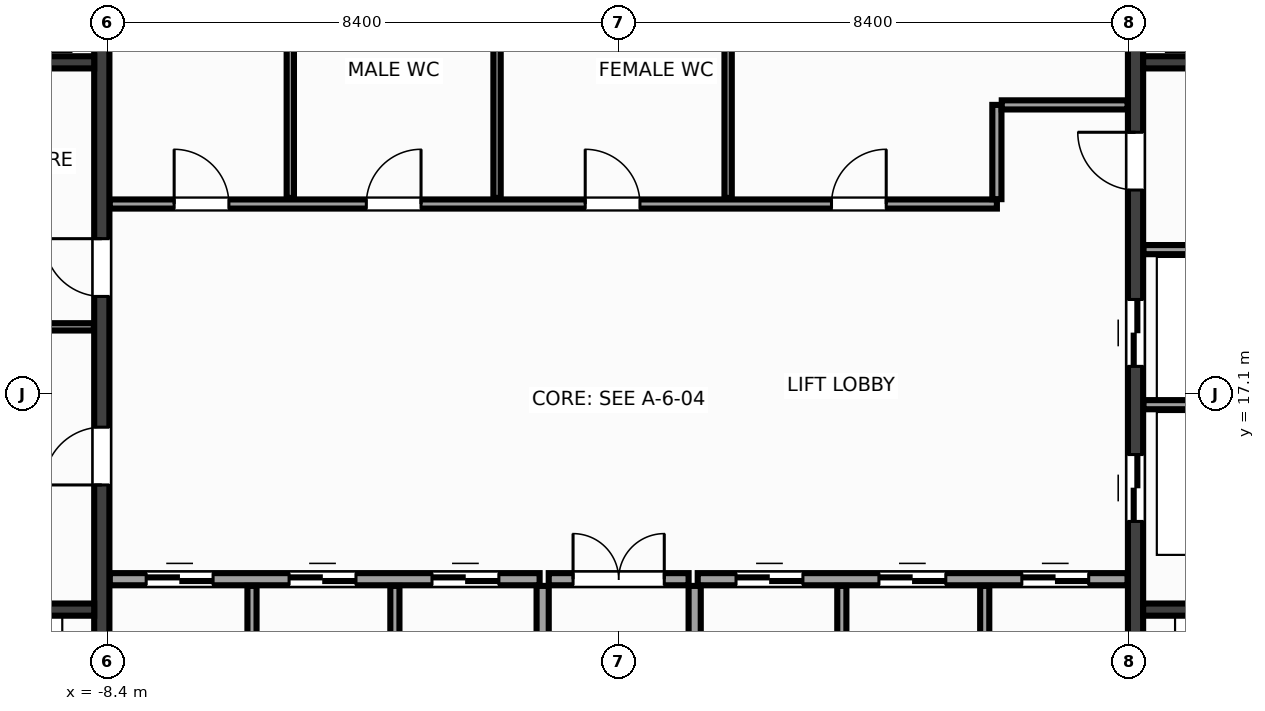
"""IFC4 building model, lengths in metres.
Left out: names, types, materials, properties, quantities, classifications, styles, units other than length and angle.
Written with IfcOpenShell. Run it as: python <this file> out.ifc"""

import sys

from ifc_helpers import new_model, si_unit, direction, frame, frame_2d, origin, place, context, subcontext, project, spatial, rectangle, extrude, source, transform, mapped, element, fill, save


model = new_model("IFC4")
c1 = context("Model", 3, precision=1e-05, world=origin(), true_north=direction((0.0, 1.0)))
c2 = subcontext(c1, "Body", "Model", "MODEL_VIEW")
j1 = project(units=[si_unit("LENGTHUNIT", "METRE"), si_unit("PLANEANGLEUNIT", "RADIAN")], contexts=[c1])
p1 = place(None, origin())
s1 = spatial("IfcSite", under=j1, at=p1, CompositionType="ELEMENT")
p2 = place(p1, origin())
s2 = spatial("IfcBuilding", under=s1, at=p2, CompositionType="ELEMENT")
p3 = place(p2, frame((0.0, 0.0, 77.6)))
s3 = spatial("IfcBuildingStorey", under=s2, at=p3, CompositionType="ELEMENT", Elevation=77.6)
m1 = source(origin(), c2, "Body", "SweptSolid", [
    extrude(rectangle(XDim=12.95, YDim=0.25, at=frame_2d((6.475, 0.0))), origin(), (0.0, 0.0, 1.0), 3.6),
])
p4 = place(p3, frame((-8.5, 10.525, 0.0), z_axis=(0.0, 0.0, 1.0), x_axis=(0.0, 1.0, 0.0)))
e1 = element("IfcWall", 1, at=p4, inside=s3, PredefinedType="SHEAR", context=c2, shape_type="MappedRepresentation", body=[
    mapped(m1, transform((0.0, 0.0, 0.0), x_axis=(1.0, 0.0, 0.0), y_axis=(0.0, 1.0, 0.0), z_axis=(0.0, 0.0, 1.0), scale=1.0)),
])
p5 = place(p4, frame((5.075, 0.0, 0.0)))
e2 = element("IfcOpeningElement", 2, at=p5, cuts=e1, PredefinedType="OPENING", context=c2, shape_type="SweptSolid", body=[
    extrude(rectangle(XDim=0.95, YDim=2.15, at=frame_2d((0.475, 1.075))), frame((0.0, 0.137, 0.0), z_axis=(0.0, -1.0, 0.0), x_axis=(1.0, 0.0, 0.0)), (0.0, 0.0, 1.0), 0.274),
])
p6 = place(p4, frame((8.175, 0.0, 0.0)))
e3 = element("IfcOpeningElement", 3, at=p6, cuts=e1, PredefinedType="OPENING", context=c2, shape_type="SweptSolid", body=[
    extrude(rectangle(XDim=0.95, YDim=2.15, at=frame_2d((0.475, 1.075))), frame((0.0, 0.137, 0.0), z_axis=(0.0, -1.0, 0.0), x_axis=(1.0, 0.0, 0.0)), (0.0, 0.0, 1.0), 0.274),
])
p7 = place(p3, frame((8.5, 10.525, 0.0), z_axis=(0.0, 0.0, 1.0), x_axis=(0.0, 1.0, 0.0)))
e4 = element("IfcWall", 4, at=p7, inside=s3, PredefinedType="SHEAR", context=c2, shape_type="MappedRepresentation", body=[
    mapped(m1, transform((0.0, 0.0, 0.0), x_axis=(1.0, 0.0, 0.0), y_axis=(0.0, 1.0, 0.0), z_axis=(0.0, 0.0, 1.0), scale=1.0)),
])
p8 = place(p7, frame((4.475, 0.0, 0.0)))
e5 = element("IfcOpeningElement", 5, at=p8, cuts=e4, PredefinedType="OPENING", context=c2, shape_type="SweptSolid", body=[
    extrude(rectangle(XDim=1.1, YDim=2.15, at=frame_2d((0.55, 1.075))), frame((0.0, 0.137, 0.0), z_axis=(0.0, -1.0, 0.0), x_axis=(1.0, 0.0, 0.0)), (0.0, 0.0, 1.0), 0.274),
])
p9 = place(p7, frame((7.025, 0.0, 0.0)))
e6 = element("IfcOpeningElement", 6, at=p9, cuts=e4, PredefinedType="OPENING", context=c2, shape_type="SweptSolid", body=[
    extrude(rectangle(XDim=1.1, YDim=2.15, at=frame_2d((0.55, 1.075))), frame((0.0, 0.137, 0.0), z_axis=(0.0, -1.0, 0.0), x_axis=(1.0, 0.0, 0.0)), (0.0, 0.0, 1.0), 0.274),
])
p10 = place(p7, frame((9.925, 0.0, 0.0)))
e7 = element("IfcOpeningElement", 7, at=p10, cuts=e4, PredefinedType="OPENING", context=c2, shape_type="SweptSolid", body=[
    extrude(rectangle(XDim=0.95, YDim=2.15, at=frame_2d((0.475, 1.075))), frame((0.0, 0.137, 0.0), z_axis=(0.0, -1.0, 0.0), x_axis=(1.0, 0.0, 0.0)), (0.0, 0.0, 1.0), 0.274),
])
m2 = source(origin(), c2, "Body", "SweptSolid", [
    extrude(rectangle(XDim=2.825, YDim=0.2, at=frame_2d((1.413, 0.0))), origin(), (0.0, 0.0, 1.0), 3.6),
])
for number, where, z_axis, x_axis in (
    (8, (-11.45, 13.55, 0.0), (0.0, 0.0, 1.0), (1.0, 0.0, 0.0)),
    (9, (8.625, 13.55, 0.0), (0.0, 0.0, 1.0), (1.0, 0.0, 0.0)),
):
    element("IfcWall", number, at=place(p3, frame(where, z_axis=z_axis, x_axis=x_axis)), inside=s3, PredefinedType="SHEAR", context=c2, shape_type="MappedRepresentation", body=[
        mapped(m2, transform((0.0, 0.0, 0.0), x_axis=(1.0, 0.0, 0.0), y_axis=(0.0, 1.0, 0.0), z_axis=(0.0, 0.0, 1.0), scale=1.0)),
    ])
m3 = source(origin(), c2, "Body", "SweptSolid", [
    extrude(rectangle(XDim=3.02, YDim=0.2, at=frame_2d((1.51, 0.0))), origin(), (0.0, 0.0, 1.0), 3.6),
])
for number, where, z_axis, x_axis in (
    (10, (-11.645, 22.55, 0.0), (0.0, 0.0, 1.0), (1.0, 0.0, 0.0)),
    (11, (8.625, 22.55, 0.0), (0.0, 0.0, 1.0), (1.0, 0.0, 0.0)),
):
    element("IfcWall", number, at=place(p3, frame(where, z_axis=z_axis, x_axis=x_axis)), inside=s3, PredefinedType="SHEAR", context=c2, shape_type="MappedRepresentation", body=[
        mapped(m3, transform((0.0, 0.0, 0.0), x_axis=(1.0, 0.0, 0.0), y_axis=(0.0, 1.0, 0.0), z_axis=(0.0, 0.0, 1.0), scale=1.0)),
    ])
m4 = source(origin(), c2, "Body", "SweptSolid", [
    extrude(rectangle(XDim=3.01, YDim=0.12, at=frame_2d((1.505, 0.0))), origin(), (0.0, 0.0, 1.0), 3.36),
])
p11 = place(p3, frame((-11.64, 18.2, 0.0), z_axis=(0.0, 0.0, 1.0), x_axis=(1.0, 0.0, 0.0)))
e12 = element("IfcWall", 12, at=p11, inside=s3, PredefinedType="PARTITIONING", context=c2, shape_type="MappedRepresentation", body=[
    mapped(m4, transform((0.0, 0.0, 0.0), x_axis=(1.0, 0.0, 0.0), y_axis=(0.0, 1.0, 0.0), z_axis=(0.0, 0.0, 1.0), scale=1.0)),
])
m5 = source(origin(), c2, "Body", "SweptSolid", [
    extrude(rectangle(XDim=3.01, YDim=0.15, at=frame_2d((1.505, 0.0))), origin(), (0.0, 0.0, 1.0), 3.36),
])
for number, where, z_axis, x_axis in (
    (13, (8.63, 16.92, 0.0), (0.0, 0.0, 1.0), (1.0, 0.0, 0.0)),
    (14, (8.63, 19.47, 0.0), (0.0, 0.0, 1.0), (1.0, 0.0, 0.0)),
):
    element("IfcWall", number, at=place(p3, frame(where, z_axis=z_axis, x_axis=x_axis)), inside=s3, PredefinedType="PARTITIONING", context=c2, shape_type="MappedRepresentation", body=[
        mapped(m5, transform((0.0, 0.0, 0.0), x_axis=(1.0, 0.0, 0.0), y_axis=(0.0, 1.0, 0.0), z_axis=(0.0, 0.0, 1.0), scale=1.0)),
    ])
m6 = source(origin(), c2, "Body", "SweptSolid", [
    extrude(rectangle(XDim=7.07, YDim=0.2, at=frame_2d((3.535, 0.0))), origin(), (0.0, 0.0, 1.0), 3.36),
])
p12 = place(p3, frame((-8.37, 14.05, 0.0), z_axis=(0.0, 0.0, 1.0), x_axis=(1.0, 0.0, 0.0)))
e15 = element("IfcWall", 15, at=p12, inside=s3, PredefinedType="PARTITIONING", context=c2, shape_type="MappedRepresentation", body=[
    mapped(m6, transform((0.0, 0.0, 0.0), x_axis=(1.0, 0.0, 0.0), y_axis=(0.0, 1.0, 0.0), z_axis=(0.0, 0.0, 1.0), scale=1.0)),
])
p13 = place(p12, frame((0.6, 0.0, 0.0)))
e16 = element("IfcOpeningElement", 16, at=p13, cuts=e15, PredefinedType="OPENING", context=c2, shape_type="SweptSolid", body=[
    extrude(rectangle(XDim=1.1, YDim=2.15, at=frame_2d((0.55, 1.075))), frame((0.0, 0.112, 0.0), z_axis=(0.0, -1.0, 0.0), x_axis=(1.0, 0.0, 0.0)), (0.0, 0.0, 1.0), 0.224),
])
p14 = place(p12, frame((2.95, 0.0, 0.0)))
e17 = element("IfcOpeningElement", 17, at=p14, cuts=e15, PredefinedType="OPENING", context=c2, shape_type="SweptSolid", body=[
    extrude(rectangle(XDim=1.1, YDim=2.15, at=frame_2d((0.55, 1.075))), frame((0.0, 0.112, 0.0), z_axis=(0.0, -1.0, 0.0), x_axis=(1.0, 0.0, 0.0)), (0.0, 0.0, 1.0), 0.224),
])
p15 = place(p12, frame((5.3, 0.0, 0.0)))
e18 = element("IfcOpeningElement", 18, at=p15, cuts=e15, PredefinedType="OPENING", context=c2, shape_type="SweptSolid", body=[
    extrude(rectangle(XDim=1.1, YDim=2.15, at=frame_2d((0.55, 1.075))), frame((0.0, 0.112, 0.0), z_axis=(0.0, -1.0, 0.0), x_axis=(1.0, 0.0, 0.0)), (0.0, 0.0, 1.0), 0.224),
])
p16 = place(p3, frame((1.3, 14.05, 0.0), z_axis=(0.0, 0.0, 1.0), x_axis=(1.0, 0.0, 0.0)))
e19 = element("IfcWall", 19, at=p16, inside=s3, PredefinedType="PARTITIONING", context=c2, shape_type="MappedRepresentation", body=[
    mapped(m6, transform((0.0, 0.0, 0.0), x_axis=(1.0, 0.0, 0.0), y_axis=(0.0, 1.0, 0.0), z_axis=(0.0, 0.0, 1.0), scale=1.0)),
])
p17 = place(p16, frame((0.63, 0.0, 0.0)))
e20 = element("IfcOpeningElement", 20, at=p17, cuts=e19, PredefinedType="OPENING", context=c2, shape_type="SweptSolid", body=[
    extrude(rectangle(XDim=1.1, YDim=2.15, at=frame_2d((0.55, 1.075))), frame((0.0, 0.112, 0.0), z_axis=(0.0, -1.0, 0.0), x_axis=(1.0, 0.0, 0.0)), (0.0, 0.0, 1.0), 0.224),
])
p18 = place(p16, frame((2.98, 0.0, 0.0)))
e21 = element("IfcOpeningElement", 21, at=p18, cuts=e19, PredefinedType="OPENING", context=c2, shape_type="SweptSolid", body=[
    extrude(rectangle(XDim=1.1, YDim=2.15, at=frame_2d((0.55, 1.075))), frame((0.0, 0.112, 0.0), z_axis=(0.0, -1.0, 0.0), x_axis=(1.0, 0.0, 0.0)), (0.0, 0.0, 1.0), 0.224),
])
p19 = place(p16, frame((5.33, 0.0, 0.0)))
e22 = element("IfcOpeningElement", 22, at=p19, cuts=e19, PredefinedType="OPENING", context=c2, shape_type="SweptSolid", body=[
    extrude(rectangle(XDim=1.1, YDim=2.15, at=frame_2d((0.55, 1.075))), frame((0.0, 0.112, 0.0), z_axis=(0.0, -1.0, 0.0), x_axis=(1.0, 0.0, 0.0)), (0.0, 0.0, 1.0), 0.224),
])
m7 = source(origin(), c2, "Body", "SweptSolid", [
    extrude(rectangle(XDim=3.415, YDim=0.2, at=frame_2d((1.708, 0.0))), origin(), (0.0, 0.0, 1.0), 3.36),
])
for number, where, z_axis, x_axis in (
    (23, (-1.25, 10.525, 0.0), (0.0, 0.0, 1.0), (0.0, 1.0, 0.0)),
    (24, (1.25, 10.525, 0.0), (0.0, 0.0, 1.0), (0.0, 1.0, 0.0)),
):
    element("IfcWall", number, at=place(p3, frame(where, z_axis=z_axis, x_axis=x_axis)), inside=s3, PredefinedType="PARTITIONING", context=c2, shape_type="MappedRepresentation", body=[
        mapped(m7, transform((0.0, 0.0, 0.0), x_axis=(1.0, 0.0, 0.0), y_axis=(0.0, 1.0, 0.0), z_axis=(0.0, 0.0, 1.0), scale=1.0)),
    ])
m8 = source(origin(), c2, "Body", "SweptSolid", [
    extrude(rectangle(XDim=2.3, YDim=0.2, at=frame_2d((1.15, 0.0))), origin(), (0.0, 0.0, 1.0), 3.36),
])
p20 = place(p3, frame((-1.15, 14.05, 0.0), z_axis=(0.0, 0.0, 1.0), x_axis=(1.0, 0.0, 0.0)))
e25 = element("IfcWall", 25, at=p20, inside=s3, PredefinedType="PARTITIONING", context=c2, shape_type="MappedRepresentation", body=[
    mapped(m8, transform((0.0, 0.0, 0.0), x_axis=(1.0, 0.0, 0.0), y_axis=(0.0, 1.0, 0.0), z_axis=(0.0, 0.0, 1.0), scale=1.0)),
])
p21 = place(p20, frame((0.4, 0.0, 0.0)))
e26 = element("IfcOpeningElement", 26, at=p21, cuts=e25, PredefinedType="OPENING", context=c2, shape_type="SweptSolid", body=[
    extrude(rectangle(XDim=1.5, YDim=2.2, at=frame_2d((0.75, 1.1))), frame((0.0, 0.112, 0.0), z_axis=(0.0, -1.0, 0.0), x_axis=(1.0, 0.0, 0.0)), (0.0, 0.0, 1.0), 0.224),
])
m9 = source(origin(), c2, "Body", "SweptSolid", [
    extrude(rectangle(XDim=14.59, YDim=0.15, at=frame_2d((7.295, 0.0))), origin(), (0.0, 0.0, 1.0), 3.36),
])
p22 = place(p3, frame((-8.37, 20.22, 0.0), z_axis=(0.0, 0.0, 1.0), x_axis=(1.0, 0.0, 0.0)))
e27 = element("IfcWall", 27, at=p22, inside=s3, PredefinedType="PARTITIONING", context=c2, shape_type="MappedRepresentation", body=[
    mapped(m9, transform((0.0, 0.0, 0.0), x_axis=(1.0, 0.0, 0.0), y_axis=(0.0, 1.0, 0.0), z_axis=(0.0, 0.0, 1.0), scale=1.0)),
])
p23 = place(p22, frame((1.06, 0.0, 0.0)))
e28 = element("IfcOpeningElement", 28, at=p23, cuts=e27, PredefinedType="OPENING", context=c2, shape_type="SweptSolid", body=[
    extrude(rectangle(XDim=0.9, YDim=2.15, at=frame_2d((0.45, 1.075))), frame((0.0, 0.087, 0.0), z_axis=(0.0, -1.0, 0.0), x_axis=(1.0, 0.0, 0.0)), (0.0, 0.0, 1.0), 0.174),
])
p24 = place(p22, frame((4.22, 0.0, 0.0)))
e29 = element("IfcOpeningElement", 29, at=p24, cuts=e27, PredefinedType="OPENING", context=c2, shape_type="SweptSolid", body=[
    extrude(rectangle(XDim=0.9, YDim=2.15, at=frame_2d((0.45, 1.075))), frame((0.0, 0.087, 0.0), z_axis=(0.0, -1.0, 0.0), x_axis=(1.0, 0.0, 0.0)), (0.0, 0.0, 1.0), 0.174),
])
p25 = place(p22, frame((7.82, 0.0, 0.0)))
e30 = element("IfcOpeningElement", 30, at=p25, cuts=e27, PredefinedType="OPENING", context=c2, shape_type="SweptSolid", body=[
    extrude(rectangle(XDim=0.9, YDim=2.15, at=frame_2d((0.45, 1.075))), frame((0.0, 0.087, 0.0), z_axis=(0.0, -1.0, 0.0), x_axis=(1.0, 0.0, 0.0)), (0.0, 0.0, 1.0), 0.174),
])
p26 = place(p22, frame((11.87, 0.0, 0.0)))
e31 = element("IfcOpeningElement", 31, at=p26, cuts=e27, PredefinedType="OPENING", context=c2, shape_type="SweptSolid", body=[
    extrude(rectangle(XDim=0.9, YDim=2.15, at=frame_2d((0.45, 1.075))), frame((0.0, 0.087, 0.0), z_axis=(0.0, -1.0, 0.0), x_axis=(1.0, 0.0, 0.0)), (0.0, 0.0, 1.0), 0.174),
])
m10 = source(origin(), c2, "Body", "SweptSolid", [
    extrude(rectangle(XDim=1.55, YDim=0.15, at=frame_2d((0.775, 0.0))), origin(), (0.0, 0.0, 1.0), 3.36),
])
p27 = place(p3, frame((6.22, 20.3, 0.0), z_axis=(0.0, 0.0, 1.0), x_axis=(0.0, 1.0, 0.0)))
e32 = element("IfcWall", 32, at=p27, inside=s3, PredefinedType="PARTITIONING", context=c2, shape_type="MappedRepresentation", body=[
    mapped(m10, transform((0.0, 0.0, 0.0), x_axis=(1.0, 0.0, 0.0), y_axis=(0.0, 1.0, 0.0), z_axis=(0.0, 0.0, 1.0), scale=1.0)),
])
m11 = source(origin(), c2, "Body", "SweptSolid", [
    extrude(rectangle(XDim=2.07, YDim=0.15, at=frame_2d((1.035, 0.0))), origin(), (0.0, 0.0, 1.0), 3.36),
])
p28 = place(p3, frame((6.3, 21.85, 0.0), z_axis=(0.0, 0.0, 1.0), x_axis=(1.0, 0.0, 0.0)))
e33 = element("IfcWall", 33, at=p28, inside=s3, PredefinedType="PARTITIONING", context=c2, shape_type="MappedRepresentation", body=[
    mapped(m11, transform((0.0, 0.0, 0.0), x_axis=(1.0, 0.0, 0.0), y_axis=(0.0, 1.0, 0.0), z_axis=(0.0, 0.0, 1.0), scale=1.0)),
])
m12 = source(origin(), c2, "Body", "SweptSolid", [
    extrude(rectangle(XDim=3.415, YDim=0.15, at=frame_2d((1.708, 0.0))), origin(), (0.0, 0.0, 1.0), 3.36),
])
for number, where, z_axis, x_axis in (
    (34, (-6.03, 10.525, 0.0), (0.0, 0.0, 1.0), (0.0, 1.0, 0.0)),
    (35, (-3.68, 10.525, 0.0), (0.0, 0.0, 1.0), (0.0, 1.0, 0.0)),
    (36, (3.67, 10.525, 0.0), (0.0, 0.0, 1.0), (0.0, 1.0, 0.0)),
    (37, (6.02, 10.525, 0.0), (0.0, 0.0, 1.0), (0.0, 1.0, 0.0)),
):
    element("IfcWall", number, at=place(p3, frame(where, z_axis=z_axis, x_axis=x_axis)), inside=s3, PredefinedType="PARTITIONING", context=c2, shape_type="MappedRepresentation", body=[
        mapped(m12, transform((0.0, 0.0, 0.0), x_axis=(1.0, 0.0, 0.0), y_axis=(0.0, 1.0, 0.0), z_axis=(0.0, 0.0, 1.0), scale=1.0)),
    ])
m13 = source(origin(), c2, "Body", "SweptSolid", [
    extrude(rectangle(XDim=3.115, YDim=0.12, at=frame_2d((1.558, 0.0))), origin(), (0.0, 0.0, 1.0), 3.36),
])
for number, where, z_axis, x_axis in (
    (38, (-5.4, 20.32, 0.0), (0.0, 0.0, 1.0), (0.0, 1.0, 0.0)),
    (39, (-2.0, 20.32, 0.0), (0.0, 0.0, 1.0), (0.0, 1.0, 0.0)),
    (40, (1.8, 20.32, 0.0), (0.0, 0.0, 1.0), (0.0, 1.0, 0.0)),
):
    element("IfcWall", number, at=place(p3, frame(where, z_axis=z_axis, x_axis=x_axis)), inside=s3, PredefinedType="PARTITIONING", context=c2, shape_type="MappedRepresentation", body=[
        mapped(m13, transform((0.0, 0.0, 0.0), x_axis=(1.0, 0.0, 0.0), y_axis=(0.0, 1.0, 0.0), z_axis=(0.0, 0.0, 1.0), scale=1.0)),
    ])
m14 = source(origin(), c2, "Body", "SweptSolid", [
    extrude(rectangle(XDim=0.95, YDim=2.15, at=frame_2d((0.475, 1.075))), frame((0.0, 0.025, 0.0), z_axis=(0.0, -1.0, 0.0), x_axis=(1.0, 0.0, 0.0)), (0.0, 0.0, 1.0), 0.05),
])
p29 = place(p5, origin())
e41 = element("IfcDoor", 41, at=p29, inside=s3, OperationType="SINGLE_SWING_LEFT", PredefinedType="DOOR", context=c2, shape_type="MappedRepresentation", body=[
    mapped(m14, transform((0.0, 0.0, 0.0), x_axis=(1.0, 0.0, 0.0), y_axis=(0.0, 1.0, 0.0), z_axis=(0.0, 0.0, 1.0), scale=1.0)),
])
fill(e2, e41)
p30 = place(p6, origin())
e42 = element("IfcDoor", 42, at=p30, inside=s3, OperationType="SINGLE_SWING_RIGHT", PredefinedType="DOOR", context=c2, shape_type="MappedRepresentation", body=[
    mapped(m14, transform((0.0, 0.0, 0.0), x_axis=(1.0, 0.0, 0.0), y_axis=(0.0, 1.0, 0.0), z_axis=(0.0, 0.0, 1.0), scale=1.0)),
])
fill(e3, e42)
m15 = source(origin(), c2, "Body", "SweptSolid", [
    extrude(rectangle(XDim=1.1, YDim=2.15, at=frame_2d((0.55, 1.075))), frame((0.0, 0.025, 0.0), z_axis=(0.0, -1.0, 0.0), x_axis=(1.0, 0.0, 0.0)), (0.0, 0.0, 1.0), 0.05),
])
p31 = place(p8, origin())
e43 = element("IfcDoor", 43, at=p31, inside=s3, OperationType="DOUBLE_DOOR_SLIDING", PredefinedType="DOOR", context=c2, shape_type="MappedRepresentation", body=[
    mapped(m15, transform((0.0, 0.0, 0.0), x_axis=(1.0, 0.0, 0.0), y_axis=(0.0, 1.0, 0.0), z_axis=(0.0, 0.0, 1.0), scale=1.0)),
])
fill(e5, e43)
p32 = place(p9, origin())
e44 = element("IfcDoor", 44, at=p32, inside=s3, OperationType="DOUBLE_DOOR_SLIDING", PredefinedType="DOOR", context=c2, shape_type="MappedRepresentation", body=[
    mapped(m15, transform((0.0, 0.0, 0.0), x_axis=(1.0, 0.0, 0.0), y_axis=(0.0, 1.0, 0.0), z_axis=(0.0, 0.0, 1.0), scale=1.0)),
])
fill(e6, e44)
m16 = source(origin(), c2, "Body", "SweptSolid", [
    extrude(rectangle(XDim=0.95, YDim=2.15, at=frame_2d((0.475, 1.075))), frame((0.0, 0.025, 0.0), z_axis=(0.0, -1.0, 0.0), x_axis=(1.0, 0.0, 0.0)), (0.0, 0.0, 1.0), 0.05),
])
p33 = place(p10, origin())
e45 = element("IfcDoor", 45, at=p33, inside=s3, OperationType="SINGLE_SWING_RIGHT", PredefinedType="DOOR", context=c2, shape_type="MappedRepresentation", body=[
    mapped(m16, transform((0.0, 0.0, 0.0), x_axis=(1.0, 0.0, 0.0), y_axis=(0.0, 1.0, 0.0), z_axis=(0.0, 0.0, 1.0), scale=1.0)),
])
fill(e7, e45)
p34 = place(p13, origin())
e46 = element("IfcDoor", 46, at=p34, inside=s3, OperationType="DOUBLE_DOOR_SLIDING", PredefinedType="DOOR", context=c2, shape_type="MappedRepresentation", body=[
    mapped(m15, transform((0.0, 0.0, 0.0), x_axis=(1.0, 0.0, 0.0), y_axis=(0.0, 1.0, 0.0), z_axis=(0.0, 0.0, 1.0), scale=1.0)),
])
fill(e16, e46)
p35 = place(p14, origin())
e47 = element("IfcDoor", 47, at=p35, inside=s3, OperationType="DOUBLE_DOOR_SLIDING", PredefinedType="DOOR", context=c2, shape_type="MappedRepresentation", body=[
    mapped(m15, transform((0.0, 0.0, 0.0), x_axis=(1.0, 0.0, 0.0), y_axis=(0.0, 1.0, 0.0), z_axis=(0.0, 0.0, 1.0), scale=1.0)),
])
fill(e17, e47)
p36 = place(p15, origin())
e48 = element("IfcDoor", 48, at=p36, inside=s3, OperationType="DOUBLE_DOOR_SLIDING", PredefinedType="DOOR", context=c2, shape_type="MappedRepresentation", body=[
    mapped(m15, transform((0.0, 0.0, 0.0), x_axis=(1.0, 0.0, 0.0), y_axis=(0.0, 1.0, 0.0), z_axis=(0.0, 0.0, 1.0), scale=1.0)),
])
fill(e18, e48)
p37 = place(p17, origin())
e49 = element("IfcDoor", 49, at=p37, inside=s3, OperationType="DOUBLE_DOOR_SLIDING", PredefinedType="DOOR", context=c2, shape_type="MappedRepresentation", body=[
    mapped(m15, transform((0.0, 0.0, 0.0), x_axis=(1.0, 0.0, 0.0), y_axis=(0.0, 1.0, 0.0), z_axis=(0.0, 0.0, 1.0), scale=1.0)),
])
fill(e20, e49)
p38 = place(p18, origin())
e50 = element("IfcDoor", 50, at=p38, inside=s3, OperationType="DOUBLE_DOOR_SLIDING", PredefinedType="DOOR", context=c2, shape_type="MappedRepresentation", body=[
    mapped(m15, transform((0.0, 0.0, 0.0), x_axis=(1.0, 0.0, 0.0), y_axis=(0.0, 1.0, 0.0), z_axis=(0.0, 0.0, 1.0), scale=1.0)),
])
fill(e21, e50)
p39 = place(p19, origin())
e51 = element("IfcDoor", 51, at=p39, inside=s3, OperationType="DOUBLE_DOOR_SLIDING", PredefinedType="DOOR", context=c2, shape_type="MappedRepresentation", body=[
    mapped(m15, transform((0.0, 0.0, 0.0), x_axis=(1.0, 0.0, 0.0), y_axis=(0.0, 1.0, 0.0), z_axis=(0.0, 0.0, 1.0), scale=1.0)),
])
fill(e22, e51)
m17 = source(origin(), c2, "Body", "SweptSolid", [
    extrude(rectangle(XDim=1.5, YDim=2.2, at=frame_2d((0.75, 1.1))), frame((0.0, 0.025, 0.0), z_axis=(0.0, -1.0, 0.0), x_axis=(1.0, 0.0, 0.0)), (0.0, 0.0, 1.0), 0.05),
])
p40 = place(p21, origin())
e52 = element("IfcDoor", 52, at=p40, inside=s3, OperationType="DOUBLE_DOOR_SINGLE_SWING", PredefinedType="DOOR", context=c2, shape_type="MappedRepresentation", body=[
    mapped(m17, transform((0.0, 0.0, 0.0), x_axis=(1.0, 0.0, 0.0), y_axis=(0.0, 1.0, 0.0), z_axis=(0.0, 0.0, 1.0), scale=1.0)),
])
fill(e26, e52)
m18 = source(origin(), c2, "Body", "SweptSolid", [
    extrude(rectangle(XDim=0.9, YDim=2.15, at=frame_2d((0.45, 1.075))), frame((0.0, 0.025, 0.0), z_axis=(0.0, -1.0, 0.0), x_axis=(1.0, 0.0, 0.0)), (0.0, 0.0, 1.0), 0.05),
])
p41 = place(p23, origin())
e53 = element("IfcDoor", 53, at=p41, inside=s3, OperationType="SINGLE_SWING_LEFT", PredefinedType="DOOR", context=c2, shape_type="MappedRepresentation", body=[
    mapped(m18, transform((0.0, 0.0, 0.0), x_axis=(1.0, 0.0, 0.0), y_axis=(0.0, 1.0, 0.0), z_axis=(0.0, 0.0, 1.0), scale=1.0)),
])
fill(e28, e53)
p42 = place(p24, origin())
e54 = element("IfcDoor", 54, at=p42, inside=s3, OperationType="SINGLE_SWING_RIGHT", PredefinedType="DOOR", context=c2, shape_type="MappedRepresentation", body=[
    mapped(m18, transform((0.0, 0.0, 0.0), x_axis=(1.0, 0.0, 0.0), y_axis=(0.0, 1.0, 0.0), z_axis=(0.0, 0.0, 1.0), scale=1.0)),
])
fill(e29, e54)
p43 = place(p25, origin())
e55 = element("IfcDoor", 55, at=p43, inside=s3, OperationType="SINGLE_SWING_LEFT", PredefinedType="DOOR", context=c2, shape_type="MappedRepresentation", body=[
    mapped(m18, transform((0.0, 0.0, 0.0), x_axis=(1.0, 0.0, 0.0), y_axis=(0.0, 1.0, 0.0), z_axis=(0.0, 0.0, 1.0), scale=1.0)),
])
fill(e30, e55)
p44 = place(p26, origin())
e56 = element("IfcDoor", 56, at=p44, inside=s3, OperationType="SINGLE_SWING_RIGHT", PredefinedType="DOOR", context=c2, shape_type="MappedRepresentation", body=[
    mapped(m18, transform((0.0, 0.0, 0.0), x_axis=(1.0, 0.0, 0.0), y_axis=(0.0, 1.0, 0.0), z_axis=(0.0, 0.0, 1.0), scale=1.0)),
])
fill(e31, e56)
save(model, sys.argv[1])
